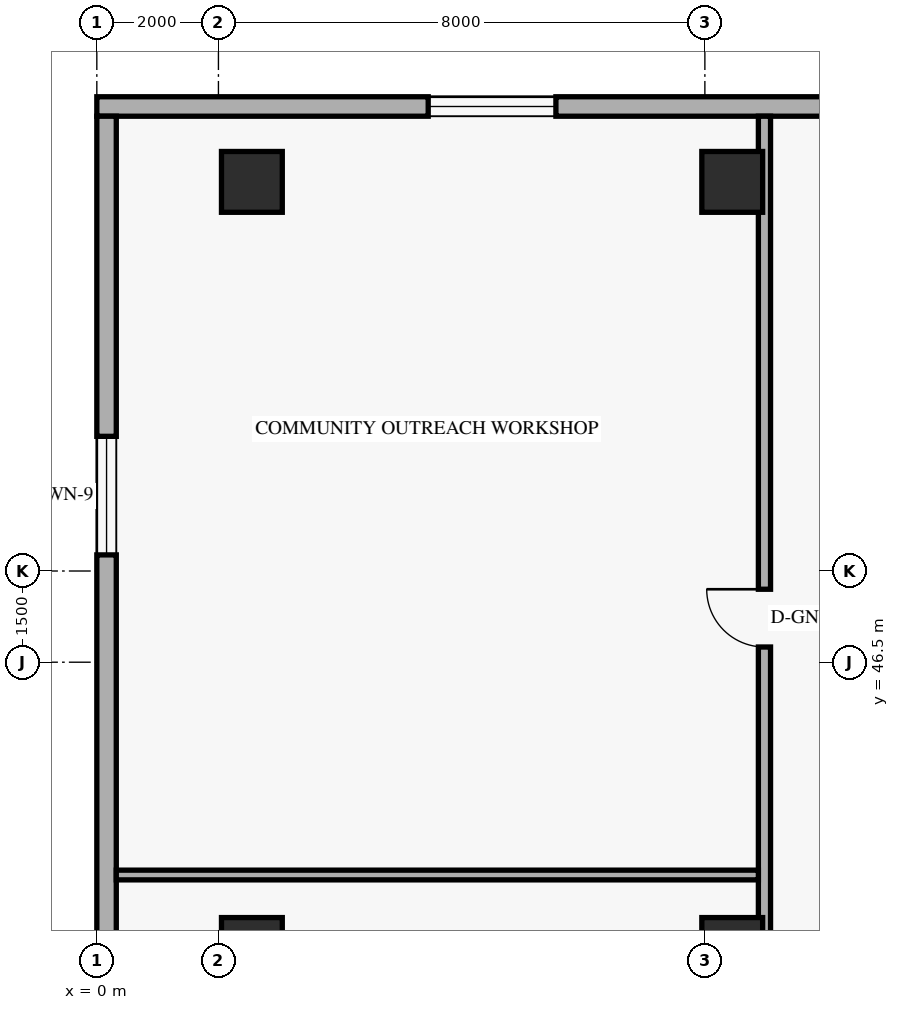
"""IFC4 building model, lengths in metres.
Left out: names, types, materials, properties, quantities, classifications, styles, units other than length and angle.
Written with IfcOpenShell. Run it as: python <this file> out.ifc"""

import sys

from ifc_helpers import new_model, si_unit, direction, frame, frame_2d, origin, origin_2d, place, context, subcontext, project, spatial, rectangle, extrude, element, fill, save


model = new_model("IFC4")
c1 = context("Model", 3, precision=1e-05, world=origin(), true_north=direction((0.0, 1.0)))
c2 = subcontext(c1, "Body", "Model", "MODEL_VIEW")
j1 = project(units=[si_unit("LENGTHUNIT", "METRE"), si_unit("PLANEANGLEUNIT", "RADIAN")], contexts=[c1])
p1 = place(None, origin())
s1 = spatial("IfcSite", under=j1, at=p1, CompositionType="ELEMENT")
p2 = place(p1, origin())
s2 = spatial("IfcBuilding", under=s1, at=p2, CompositionType="ELEMENT")
p3 = place(p2, origin())
s3 = spatial("IfcBuildingStorey", under=s2, at=p3, CompositionType="ELEMENT", Elevation=0.0)
for number, where, z_axis, x_axis in (
    (1, (2.55, 41.8, 0.0), (0.0, 0.0, 1.0), (1.0, 0.0, 0.0)),
    (2, (2.55, 54.4, 0.0), (0.0, 0.0, 1.0), (1.0, 0.0, 0.0)),
    (3, (10.45, 41.8, 0.0), (0.0, 0.0, 1.0), (1.0, 0.0, 0.0)),
    (4, (10.45, 54.4, 0.0), (0.0, 0.0, 1.0), (1.0, 0.0, 0.0)),
):
    element("IfcColumn", number, at=place(p3, frame(where, z_axis=z_axis, x_axis=x_axis)), inside=s3, PredefinedType="COLUMN", context=c2, shape_type="SweptSolid", body=[
        extrude(rectangle(XDim=1.0, YDim=1.0, at=origin_2d()), origin(), (0.0, 0.0, 1.0), 4.8),
    ])
p4 = place(p3, frame((0.0, 55.64, 0.0), z_axis=(0.0, 0.0, 1.0), x_axis=(1.0, 0.0, 0.0)))
e5 = element("IfcWall", 5, at=p4, inside=s3, PredefinedType="SOLIDWALL", context=c2, shape_type="SweptSolid", body=[
    extrude(rectangle(XDim=56.0, YDim=0.32, at=frame_2d((28.0, 0.0))), origin(), (0.0, 0.0, 1.0), 4.39),
])
p5 = place(p4, frame((29.6, 0.0, 0.0)))
e6 = element("IfcOpeningElement", 6, at=p5, cuts=e5, PredefinedType="OPENING", context=c2, shape_type="SweptSolid", body=[
    extrude(rectangle(XDim=1.8, YDim=2.25, at=frame_2d((0.9, 1.125))), frame((0.0, 0.17, 0.0), z_axis=(0.0, -1.0, 0.0), x_axis=(1.0, 0.0, 0.0)), (0.0, 0.0, 1.0), 0.34),
])
p6 = place(p4, frame((15.2, 0.0, 0.0)))
e7 = element("IfcOpeningElement", 7, at=p6, cuts=e5, PredefinedType="OPENING", context=c2, shape_type="SweptSolid", body=[
    extrude(rectangle(XDim=2.0, YDim=2.35, at=frame_2d((1.0, 1.175))), frame((0.0, 0.17, 0.0), z_axis=(0.0, -1.0, 0.0), x_axis=(1.0, 0.0, 0.0)), (0.0, 0.0, 1.0), 0.34),
])
p7 = place(p4, frame((5.45, 0.0, 0.85)))
e8 = element("IfcOpeningElement", 8, at=p7, cuts=e5, PredefinedType="OPENING", context=c2, shape_type="SweptSolid", body=[
    extrude(rectangle(XDim=2.1, YDim=1.75, at=frame_2d((1.05, 0.875))), frame((0.0, 0.17, 0.0), z_axis=(0.0, -1.0, 0.0), x_axis=(1.0, 0.0, 0.0)), (0.0, 0.0, 1.0), 0.34),
])
p8 = place(p4, frame((20.175, 0.0, 0.85)))
e9 = element("IfcOpeningElement", 9, at=p8, cuts=e5, PredefinedType="OPENING", context=c2, shape_type="SweptSolid", body=[
    extrude(rectangle(XDim=2.1, YDim=1.75, at=frame_2d((1.05, 0.875))), frame((0.0, 0.17, 0.0), z_axis=(0.0, -1.0, 0.0), x_axis=(1.0, 0.0, 0.0)), (0.0, 0.0, 1.0), 0.34),
])
p9 = place(p4, frame((45.948, 0.0, 0.85)))
e10 = element("IfcOpeningElement", 10, at=p9, cuts=e5, PredefinedType="OPENING", context=c2, shape_type="SweptSolid", body=[
    extrude(rectangle(XDim=2.1, YDim=1.75, at=frame_2d((1.05, 0.875))), frame((0.0, 0.17, 0.0), z_axis=(0.0, -1.0, 0.0), x_axis=(1.0, 0.0, 0.0)), (0.0, 0.0, 1.0), 0.34),
])
p10 = place(p3, frame((0.16, 0.32, 0.0), z_axis=(0.0, 0.0, 1.0), x_axis=(0.0, 1.0, 0.0)))
e11 = element("IfcWall", 11, at=p10, inside=s3, PredefinedType="SOLIDWALL", context=c2, shape_type="SweptSolid", body=[
    extrude(rectangle(XDim=55.16, YDim=0.32, at=frame_2d((27.58, 0.0))), origin(), (0.0, 0.0, 1.0), 4.39),
])
p11 = place(p10, frame((1.5, 0.0, 0.0)))
e12 = element("IfcOpeningElement", 12, at=p11, cuts=e11, PredefinedType="OPENING", context=c2, shape_type="SweptSolid", body=[
    extrude(rectangle(XDim=3.6, YDim=3.5, at=frame_2d((1.8, 1.75))), frame((0.0, 0.17, 0.0), z_axis=(0.0, -1.0, 0.0), x_axis=(1.0, 0.0, 0.0)), (0.0, 0.0, 1.0), 0.34),
])
p12 = place(p10, frame((11.4, 0.0, 0.0)))
e13 = element("IfcOpeningElement", 13, at=p12, cuts=e11, PredefinedType="OPENING", context=c2, shape_type="SweptSolid", body=[
    extrude(rectangle(XDim=2.4, YDim=2.55, at=frame_2d((1.2, 1.275))), frame((0.0, 0.17, 0.0), z_axis=(0.0, -1.0, 0.0), x_axis=(1.0, 0.0, 0.0)), (0.0, 0.0, 1.0), 0.34),
])
p13 = place(p10, frame((28.5, 0.0, 0.0)))
e14 = element("IfcOpeningElement", 14, at=p13, cuts=e11, PredefinedType="OPENING", context=c2, shape_type="SweptSolid", body=[
    extrude(rectangle(XDim=2.4, YDim=2.55, at=frame_2d((1.2, 1.275))), frame((0.0, 0.17, 0.0), z_axis=(0.0, -1.0, 0.0), x_axis=(1.0, 0.0, 0.0)), (0.0, 0.0, 1.0), 0.34),
])
p14 = place(p10, frame((34.2, 0.0, 0.0)))
e15 = element("IfcOpeningElement", 15, at=p14, cuts=e11, PredefinedType="OPENING", context=c2, shape_type="SweptSolid", body=[
    extrude(rectangle(XDim=2.4, YDim=2.55, at=frame_2d((1.2, 1.275))), frame((0.0, 0.17, 0.0), z_axis=(0.0, -1.0, 0.0), x_axis=(1.0, 0.0, 0.0)), (0.0, 0.0, 1.0), 0.34),
])
p15 = place(p10, frame((20.105, 0.0, 0.85)))
e16 = element("IfcOpeningElement", 16, at=p15, cuts=e11, PredefinedType="OPENING", context=c2, shape_type="SweptSolid", body=[
    extrude(rectangle(XDim=1.95, YDim=1.75, at=frame_2d((0.975, 0.875))), frame((0.0, 0.17, 0.0), z_axis=(0.0, -1.0, 0.0), x_axis=(1.0, 0.0, 0.0)), (0.0, 0.0, 1.0), 0.34),
])
p16 = place(p10, frame((39.275, 0.0, 0.85)))
e17 = element("IfcOpeningElement", 17, at=p16, cuts=e11, PredefinedType="OPENING", context=c2, shape_type="SweptSolid", body=[
    extrude(rectangle(XDim=1.95, YDim=1.75, at=frame_2d((0.975, 0.875))), frame((0.0, 0.17, 0.0), z_axis=(0.0, -1.0, 0.0), x_axis=(1.0, 0.0, 0.0)), (0.0, 0.0, 1.0), 0.34),
])
p17 = place(p10, frame((47.945, 0.0, 0.85)))
e18 = element("IfcOpeningElement", 18, at=p17, cuts=e11, PredefinedType="OPENING", context=c2, shape_type="SweptSolid", body=[
    extrude(rectangle(XDim=1.95, YDim=1.75, at=frame_2d((0.975, 0.875))), frame((0.0, 0.17, 0.0), z_axis=(0.0, -1.0, 0.0), x_axis=(1.0, 0.0, 0.0)), (0.0, 0.0, 1.0), 0.34),
])
p18 = place(p3, frame((10.98, 19.36, 0.0), z_axis=(0.0, 0.0, 1.0), x_axis=(0.0, 1.0, 0.0)))
e19 = element("IfcWall", 19, at=p18, inside=s3, PredefinedType="STANDARD", context=c2, shape_type="SweptSolid", body=[
    extrude(rectangle(XDim=36.12, YDim=0.2, at=frame_2d((18.06, 0.0))), origin(), (0.0, 0.0, 1.0), 3.272),
])
p19 = place(p18, frame((3.09, 0.0, 0.0)))
e20 = element("IfcOpeningElement", 20, at=p19, cuts=e19, PredefinedType="OPENING", context=c2, shape_type="SweptSolid", body=[
    extrude(rectangle(XDim=0.95, YDim=2.15, at=frame_2d((0.475, 1.075))), frame((0.0, 0.11, 0.0), z_axis=(0.0, -1.0, 0.0), x_axis=(1.0, 0.0, 0.0)), (0.0, 0.0, 1.0), 0.22),
])
p20 = place(p18, frame((13.39, 0.0, 0.0)))
e21 = element("IfcOpeningElement", 21, at=p20, cuts=e19, PredefinedType="OPENING", context=c2, shape_type="SweptSolid", body=[
    extrude(rectangle(XDim=0.95, YDim=2.15, at=frame_2d((0.475, 1.075))), frame((0.0, 0.11, 0.0), z_axis=(0.0, -1.0, 0.0), x_axis=(1.0, 0.0, 0.0)), (0.0, 0.0, 1.0), 0.22),
])
p21 = place(p18, frame((27.39, 0.0, 0.0)))
e22 = element("IfcOpeningElement", 22, at=p21, cuts=e19, PredefinedType="OPENING", context=c2, shape_type="SweptSolid", body=[
    extrude(rectangle(XDim=0.95, YDim=2.15, at=frame_2d((0.475, 1.075))), frame((0.0, 0.11, 0.0), z_axis=(0.0, -1.0, 0.0), x_axis=(1.0, 0.0, 0.0)), (0.0, 0.0, 1.0), 0.22),
])
p22 = place(p3, frame((0.32, 43.0, 0.0), z_axis=(0.0, 0.0, 1.0), x_axis=(1.0, 0.0, 0.0)))
e23 = element("IfcWall", 23, at=p22, inside=s3, PredefinedType="PARTITIONING", context=c2, shape_type="SweptSolid", body=[
    extrude(rectangle(XDim=10.56, YDim=0.16, at=frame_2d((5.28, 0.0))), origin(), (0.0, 0.0, 1.0), 3.521),
])
p23 = place(p7, origin())
e24 = element("IfcWindow", 24, at=p23, inside=s3, PartitioningType="SINGLE_PANEL", PredefinedType="WINDOW", context=c2, shape_type="SweptSolid", body=[
    extrude(rectangle(XDim=2.1, YDim=1.75, at=frame_2d((1.05, 0.875))), frame((0.0, 0.03, 0.0), z_axis=(0.0, -1.0, 0.0), x_axis=(1.0, 0.0, 0.0)), (0.0, 0.0, 1.0), 0.06),
])
fill(e8, e24)
p24 = place(p17, origin())
e25 = element("IfcWindow", 25, at=p24, inside=s3, PartitioningType="SINGLE_PANEL", PredefinedType="WINDOW", context=c2, shape_type="SweptSolid", body=[
    extrude(rectangle(XDim=1.95, YDim=1.75, at=frame_2d((0.975, 0.875))), frame((0.0, 0.03, 0.0), z_axis=(0.0, -1.0, 0.0), x_axis=(1.0, 0.0, 0.0)), (0.0, 0.0, 1.0), 0.06),
])
fill(e18, e25)
p25 = place(p21, origin())
e26 = element("IfcDoor", 26, at=p25, inside=s3, OperationType="SINGLE_SWING_RIGHT", PredefinedType="DOOR", context=c2, shape_type="SweptSolid", body=[
    extrude(rectangle(XDim=0.95, YDim=2.15, at=frame_2d((0.475, 1.075))), frame((0.0, 0.025, 0.0), z_axis=(0.0, -1.0, 0.0), x_axis=(1.0, 0.0, 0.0)), (0.0, 0.0, 1.0), 0.05),
])
fill(e22, e26)
save(model, sys.argv[1])
